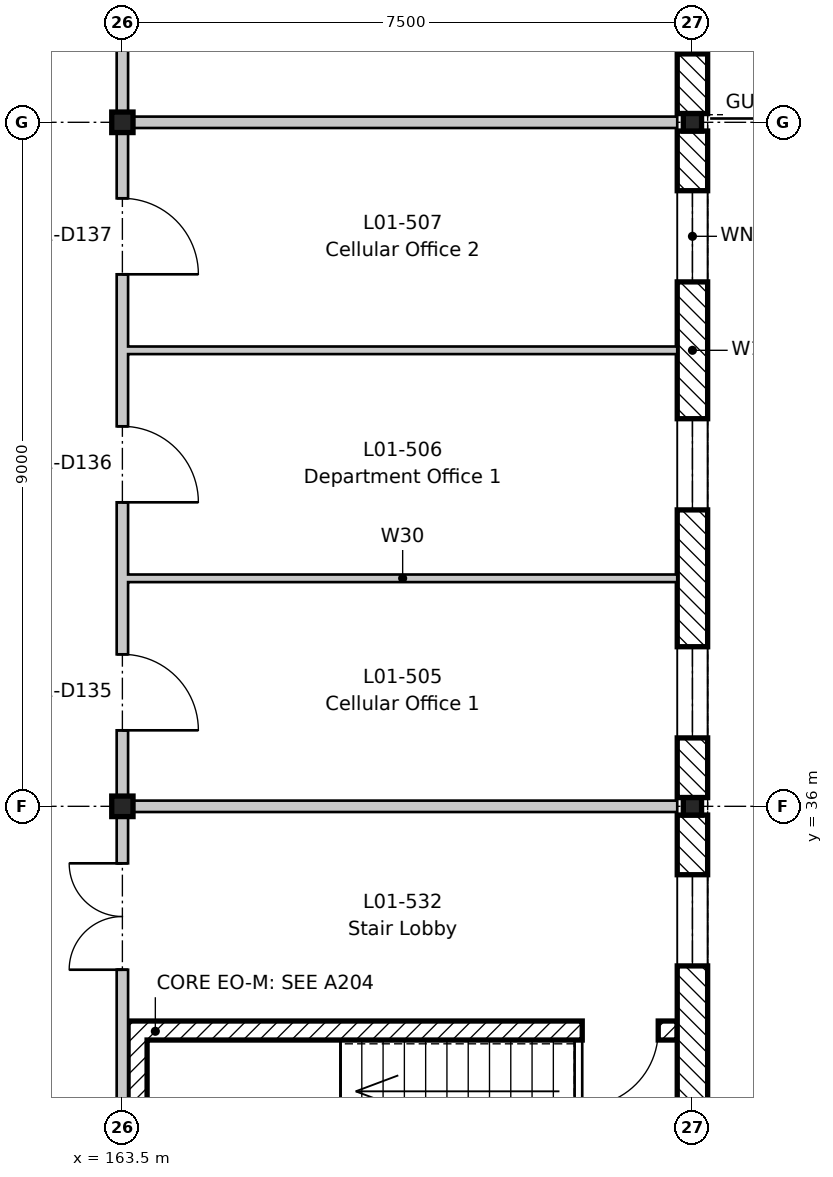
"""IFC4 building model, lengths in metres.
Left out: names, types, materials, properties, quantities, classifications, styles, units other than length and angle.
Written with IfcOpenShell. Run it as: python <this file> out.ifc"""

import sys

from ifc_helpers import new_model, si_unit, direction, frame, frame_2d, origin, origin_2d, place, context, subcontext, project, spatial, rectangle, i_section, extrude, element, fill, save


model = new_model("IFC4")
c1 = context("Model", 3, precision=1e-05, world=origin(), true_north=direction((0.0, 1.0)))
c2 = subcontext(c1, "Body", "Model", "MODEL_VIEW")
j1 = project(units=[si_unit("LENGTHUNIT", "METRE"), si_unit("PLANEANGLEUNIT", "RADIAN")], contexts=[c1])
p1 = place(None, origin())
s1 = spatial("IfcSite", under=j1, at=p1, CompositionType="ELEMENT")
p2 = place(p1, origin())
s2 = spatial("IfcBuilding", under=s1, at=p2, CompositionType="ELEMENT")
p3 = place(p2, frame((0.0, 0.0, 5.4)))
s3 = spatial("IfcBuildingStorey", under=s2, at=p3, CompositionType="ELEMENT", Elevation=5.4)
for number, where, z_axis, x_axis in (
    (1, (163.5, 36.0, -0.2), (0.0, 0.0, 1.0), (1.0, 0.0, 0.0)),
    (2, (163.5, 45.0, -0.2), (0.0, 0.0, 1.0), (1.0, 0.0, 0.0)),
):
    element("IfcColumn", number, at=place(p3, frame(where, z_axis=z_axis, x_axis=x_axis)), inside=s3, PredefinedType="COLUMN", context=c2, shape_type="SweptSolid", body=[
        extrude(i_section(OverallWidth=0.28, OverallDepth=0.27, WebThickness=0.008, FlangeThickness=0.013, FilletRadius=0.024, at=origin_2d()), origin(), (0.0, 0.0, 1.0), 4.5),
    ])
for number, where, z_axis, x_axis in (
    (3, (171.0, 36.0, -0.2), (0.0, 0.0, 1.0), (1.0, 0.0, 0.0)),
    (4, (171.0, 45.0, -0.2), (0.0, 0.0, 1.0), (1.0, 0.0, 0.0)),
):
    element("IfcColumn", number, at=place(p3, frame(where, z_axis=z_axis, x_axis=x_axis)), inside=s3, PredefinedType="COLUMN", context=c2, shape_type="SweptSolid", body=[
        extrude(i_section(OverallWidth=0.24, OverallDepth=0.23, WebThickness=0.008, FlangeThickness=0.012, FilletRadius=0.021, at=origin_2d()), origin(), (0.0, 0.0, 1.0), 4.5),
    ])
p4 = place(p3, frame((163.575, 33.05, 0.0), z_axis=(0.0, 0.0, 1.0), x_axis=(1.0, 0.0, 0.0)))
e5 = element("IfcWall", 5, at=p4, inside=s3, PredefinedType="SHEAR", context=c2, shape_type="SweptSolid", body=[
    extrude(rectangle(XDim=7.225, YDim=0.25, at=frame_2d((3.613, 0.0))), origin(), (0.0, 0.0, 1.0), 4.3),
])
p5 = place(p4, frame((5.975, 0.0, 0.0)))
e6 = element("IfcOpeningElement", 6, at=p5, cuts=e5, PredefinedType="OPENING", context=c2, shape_type="SweptSolid", body=[
    extrude(rectangle(XDim=1.0, YDim=2.1, at=frame_2d((0.5, 1.05))), frame((0.0, 0.135, 0.0), z_axis=(0.0, -1.0, 0.0), x_axis=(1.0, 0.0, 0.0)), (0.0, 0.0, 1.0), 0.27),
])
p6 = place(p3, frame((163.7, 30.075, 0.0), z_axis=(0.0, 0.0, 1.0), x_axis=(0.0, 1.0, 0.0)))
e7 = element("IfcWall", 7, at=p6, inside=s3, PredefinedType="SHEAR", context=c2, shape_type="SweptSolid", body=[
    extrude(rectangle(XDim=2.85, YDim=0.25, at=frame_2d((1.425, 0.0))), origin(), (0.0, 0.0, 1.0), 4.3),
])
p7 = place(p3, frame((171.0, 35.885, 0.0), z_axis=(0.0, 0.0, 1.0), x_axis=(0.0, -1.0, 0.0)))
e8 = element("IfcWall", 8, at=p7, inside=s3, PredefinedType="STANDARD", context=c2, shape_type="SweptSolid", body=[
    extrude(rectangle(XDim=8.77, YDim=0.4, at=frame_2d((4.385, 0.0))), origin(), (0.0, 0.0, 1.0), 3.9),
])
p8 = place(p7, frame((3.785, 0.0, 0.9)))
e9 = element("IfcOpeningElement", 9, at=p8, cuts=e8, PredefinedType="OPENING", context=c2, shape_type="SweptSolid", body=[
    extrude(rectangle(XDim=1.2, YDim=2.7, at=frame_2d((0.6, 1.35))), frame((0.0, 0.21, 0.0), z_axis=(0.0, -1.0, 0.0), x_axis=(1.0, 0.0, 0.0)), (0.0, 0.0, 1.0), 0.42),
])
p9 = place(p7, frame((0.785, 0.0, 0.9)))
e10 = element("IfcOpeningElement", 10, at=p9, cuts=e8, PredefinedType="OPENING", context=c2, shape_type="SweptSolid", body=[
    extrude(rectangle(XDim=1.2, YDim=2.4, at=frame_2d((0.6, 1.2))), frame((0.0, 0.21, 0.0), z_axis=(0.0, -1.0, 0.0), x_axis=(1.0, 0.0, 0.0)), (0.0, 0.0, 1.0), 0.42),
])
p10 = place(p3, frame((171.0, 44.885, 0.0), z_axis=(0.0, 0.0, 1.0), x_axis=(0.0, -1.0, 0.0)))
e11 = element("IfcWall", 11, at=p10, inside=s3, PredefinedType="STANDARD", context=c2, shape_type="SweptSolid", body=[
    extrude(rectangle(XDim=8.77, YDim=0.4, at=frame_2d((4.385, 0.0))), origin(), (0.0, 0.0, 1.0), 3.9),
])
p11 = place(p10, frame((6.785, 0.0, 0.9)))
e12 = element("IfcOpeningElement", 12, at=p11, cuts=e11, PredefinedType="OPENING", context=c2, shape_type="SweptSolid", body=[
    extrude(rectangle(XDim=1.2, YDim=2.4, at=frame_2d((0.6, 1.2))), frame((0.0, 0.21, 0.0), z_axis=(0.0, -1.0, 0.0), x_axis=(1.0, 0.0, 0.0)), (0.0, 0.0, 1.0), 0.42),
])
p12 = place(p10, frame((3.785, 0.0, 0.9)))
e13 = element("IfcOpeningElement", 13, at=p12, cuts=e11, PredefinedType="OPENING", context=c2, shape_type="SweptSolid", body=[
    extrude(rectangle(XDim=1.2, YDim=2.4, at=frame_2d((0.6, 1.2))), frame((0.0, 0.21, 0.0), z_axis=(0.0, -1.0, 0.0), x_axis=(1.0, 0.0, 0.0)), (0.0, 0.0, 1.0), 0.42),
])
p13 = place(p10, frame((0.785, 0.0, 0.9)))
e14 = element("IfcOpeningElement", 14, at=p13, cuts=e11, PredefinedType="OPENING", context=c2, shape_type="SweptSolid", body=[
    extrude(rectangle(XDim=1.2, YDim=2.4, at=frame_2d((0.6, 1.2))), frame((0.0, 0.21, 0.0), z_axis=(0.0, -1.0, 0.0), x_axis=(1.0, 0.0, 0.0)), (0.0, 0.0, 1.0), 0.42),
])
p14 = place(p3, frame((171.0, 53.885, 0.0), z_axis=(0.0, 0.0, 1.0), x_axis=(0.0, -1.0, 0.0)))
e15 = element("IfcWall", 15, at=p14, inside=s3, PredefinedType="STANDARD", context=c2, shape_type="SweptSolid", body=[
    extrude(rectangle(XDim=8.77, YDim=0.4, at=frame_2d((4.385, 0.0))), origin(), (0.0, 0.0, 1.0), 3.9),
])
p15 = place(p14, frame((6.785, 0.0, 0.9)))
e16 = element("IfcOpeningElement", 16, at=p15, cuts=e15, PredefinedType="OPENING", context=c2, shape_type="SweptSolid", body=[
    extrude(rectangle(XDim=1.2, YDim=2.4, at=frame_2d((0.6, 1.2))), frame((0.0, 0.21, 0.0), z_axis=(0.0, -1.0, 0.0), x_axis=(1.0, 0.0, 0.0)), (0.0, 0.0, 1.0), 0.42),
])
p16 = place(p14, frame((3.785, 0.0, 0.9)))
e17 = element("IfcOpeningElement", 17, at=p16, cuts=e15, PredefinedType="OPENING", context=c2, shape_type="SweptSolid", body=[
    extrude(rectangle(XDim=1.2, YDim=2.4, at=frame_2d((0.6, 1.2))), frame((0.0, 0.21, 0.0), z_axis=(0.0, -1.0, 0.0), x_axis=(1.0, 0.0, 0.0)), (0.0, 0.0, 1.0), 0.42),
])
p17 = place(p3, frame((163.575, 36.0, 0.0), z_axis=(0.0, 0.0, 1.0), x_axis=(1.0, 0.0, 0.0)))
e18 = element("IfcWall", 18, at=p17, inside=s3, PredefinedType="PARTITIONING", context=c2, shape_type="SweptSolid", body=[
    extrude(rectangle(XDim=7.225, YDim=0.15, at=frame_2d((3.613, 0.0))), origin(), (0.0, 0.0, 1.0), 3.95),
])
for number, where, z_axis, x_axis in (
    (19, (163.575, 39.0, 0.0), (0.0, 0.0, 1.0), (1.0, 0.0, 0.0)),
    (20, (163.575, 42.0, 0.0), (0.0, 0.0, 1.0), (1.0, 0.0, 0.0)),
):
    element("IfcWall", number, at=place(p3, frame(where, z_axis=z_axis, x_axis=x_axis)), inside=s3, PredefinedType="PARTITIONING", context=c2, shape_type="SweptSolid", body=[
        extrude(rectangle(XDim=7.225, YDim=0.1, at=frame_2d((3.613, 0.0))), origin(), (0.0, 0.0, 1.0), 4.3),
    ])
p18 = place(p3, frame((163.575, 45.0, 0.0), z_axis=(0.0, 0.0, 1.0), x_axis=(1.0, 0.0, 0.0)))
e21 = element("IfcWall", 21, at=p18, inside=s3, PredefinedType="PARTITIONING", context=c2, shape_type="SweptSolid", body=[
    extrude(rectangle(XDim=7.225, YDim=0.15, at=frame_2d((3.613, 0.0))), origin(), (0.0, 0.0, 1.0), 3.95),
])
p19 = place(p3, frame((163.5, -8.8, 0.0), z_axis=(0.0, 0.0, 1.0), x_axis=(0.0, 1.0, 0.0)))
e22 = element("IfcWall", 22, at=p19, inside=s3, PredefinedType="PARTITIONING", context=c2, shape_type="SweptSolid", body=[
    extrude(rectangle(XDim=62.6, YDim=0.15, at=frame_2d((31.3, 0.0))), origin(), (0.0, 0.0, 1.0), 3.78),
])
p20 = place(p19, frame((18.8, 0.0, 0.0)))
e23 = element("IfcOpeningElement", 23, at=p20, cuts=e22, PredefinedType="OPENING", context=c2, shape_type="SweptSolid", body=[
    extrude(rectangle(XDim=1.0, YDim=2.1, at=frame_2d((0.5, 1.05))), frame((0.0, 0.085, 0.0), z_axis=(0.0, -1.0, 0.0), x_axis=(1.0, 0.0, 0.0)), (0.0, 0.0, 1.0), 0.17),
])
p21 = place(p19, frame((23.3, 0.0, 0.0)))
e24 = element("IfcOpeningElement", 24, at=p21, cuts=e22, PredefinedType="OPENING", context=c2, shape_type="SweptSolid", body=[
    extrude(rectangle(XDim=1.0, YDim=2.1, at=frame_2d((0.5, 1.05))), frame((0.0, 0.085, 0.0), z_axis=(0.0, -1.0, 0.0), x_axis=(1.0, 0.0, 0.0)), (0.0, 0.0, 1.0), 0.17),
])
p22 = place(p19, frame((29.3, 0.0, 0.0)))
e25 = element("IfcOpeningElement", 25, at=p22, cuts=e22, PredefinedType="OPENING", context=c2, shape_type="SweptSolid", body=[
    extrude(rectangle(XDim=1.0, YDim=2.1, at=frame_2d((0.5, 1.05))), frame((0.0, 0.085, 0.0), z_axis=(0.0, -1.0, 0.0), x_axis=(1.0, 0.0, 0.0)), (0.0, 0.0, 1.0), 0.17),
])
p23 = place(p19, frame((33.8, 0.0, 0.0)))
e26 = element("IfcOpeningElement", 26, at=p23, cuts=e22, PredefinedType="OPENING", context=c2, shape_type="SweptSolid", body=[
    extrude(rectangle(XDim=1.0, YDim=2.1, at=frame_2d((0.5, 1.05))), frame((0.0, 0.085, 0.0), z_axis=(0.0, -1.0, 0.0), x_axis=(1.0, 0.0, 0.0)), (0.0, 0.0, 1.0), 0.17),
])
p24 = place(p19, frame((45.8, 0.0, 0.0)))
e27 = element("IfcOpeningElement", 27, at=p24, cuts=e22, PredefinedType="OPENING", context=c2, shape_type="SweptSolid", body=[
    extrude(rectangle(XDim=1.0, YDim=2.1, at=frame_2d((0.5, 1.05))), frame((0.0, 0.085, 0.0), z_axis=(0.0, -1.0, 0.0), x_axis=(1.0, 0.0, 0.0)), (0.0, 0.0, 1.0), 0.17),
])
p25 = place(p19, frame((48.8, 0.0, 0.0)))
e28 = element("IfcOpeningElement", 28, at=p25, cuts=e22, PredefinedType="OPENING", context=c2, shape_type="SweptSolid", body=[
    extrude(rectangle(XDim=1.0, YDim=2.1, at=frame_2d((0.5, 1.05))), frame((0.0, 0.085, 0.0), z_axis=(0.0, -1.0, 0.0), x_axis=(1.0, 0.0, 0.0)), (0.0, 0.0, 1.0), 0.17),
])
p26 = place(p19, frame((51.8, 0.0, 0.0)))
e29 = element("IfcOpeningElement", 29, at=p26, cuts=e22, PredefinedType="OPENING", context=c2, shape_type="SweptSolid", body=[
    extrude(rectangle(XDim=1.0, YDim=2.1, at=frame_2d((0.5, 1.05))), frame((0.0, 0.085, 0.0), z_axis=(0.0, -1.0, 0.0), x_axis=(1.0, 0.0, 0.0)), (0.0, 0.0, 1.0), 0.17),
])
p27 = place(p19, frame((12.6, 0.0, 0.0)))
e30 = element("IfcOpeningElement", 30, at=p27, cuts=e22, PredefinedType="OPENING", context=c2, shape_type="SweptSolid", body=[
    extrude(rectangle(XDim=1.4, YDim=2.1, at=frame_2d((0.7, 1.05))), frame((0.0, 0.085, 0.0), z_axis=(0.0, -1.0, 0.0), x_axis=(1.0, 0.0, 0.0)), (0.0, 0.0, 1.0), 0.17),
])
p28 = place(p19, frame((3.6, 0.0, 0.0)))
e31 = element("IfcOpeningElement", 31, at=p28, cuts=e22, PredefinedType="OPENING", context=c2, shape_type="SweptSolid", body=[
    extrude(rectangle(XDim=1.4, YDim=2.1, at=frame_2d((0.7, 1.05))), frame((0.0, 0.085, 0.0), z_axis=(0.0, -1.0, 0.0), x_axis=(1.0, 0.0, 0.0)), (0.0, 0.0, 1.0), 0.17),
])
p29 = place(p19, frame((57.6, 0.0, 0.0)))
e32 = element("IfcOpeningElement", 32, at=p29, cuts=e22, PredefinedType="OPENING", context=c2, shape_type="SweptSolid", body=[
    extrude(rectangle(XDim=1.4, YDim=2.1, at=frame_2d((0.7, 1.05))), frame((0.0, 0.085, 0.0), z_axis=(0.0, -1.0, 0.0), x_axis=(1.0, 0.0, 0.0)), (0.0, 0.0, 1.0), 0.17),
])
p30 = place(p19, frame((36.75, 0.0, 0.0)))
e33 = element("IfcOpeningElement", 33, at=p30, cuts=e22, PredefinedType="OPENING", context=c2, shape_type="SweptSolid", body=[
    extrude(rectangle(XDim=1.0, YDim=2.1, at=frame_2d((0.5, 1.05))), frame((0.0, 0.085, 0.0), z_axis=(0.0, -1.0, 0.0), x_axis=(1.0, 0.0, 0.0)), (0.0, 0.0, 1.0), 0.17),
])
p31 = place(p19, frame((42.65, 0.0, 0.0)))
e34 = element("IfcOpeningElement", 34, at=p31, cuts=e22, PredefinedType="OPENING", context=c2, shape_type="SweptSolid", body=[
    extrude(rectangle(XDim=1.4, YDim=2.1, at=frame_2d((0.7, 1.05))), frame((0.0, 0.085, 0.0), z_axis=(0.0, -1.0, 0.0), x_axis=(1.0, 0.0, 0.0)), (0.0, 0.0, 1.0), 0.17),
])
p32 = place(p9, origin())
e35 = element("IfcWindow", 35, at=p32, inside=s3, PartitioningType="SINGLE_PANEL", PredefinedType="WINDOW", context=c2, shape_type="SweptSolid", body=[
    extrude(rectangle(XDim=1.2, YDim=2.4, at=frame_2d((0.6, 1.2))), frame((0.0, -0.12, 0.0), z_axis=(0.0, -1.0, 0.0), x_axis=(1.0, 0.0, 0.0)), (0.0, 0.0, 1.0), 0.06),
])
fill(e10, e35)
p33 = place(p11, origin())
e36 = element("IfcWindow", 36, at=p33, inside=s3, PartitioningType="SINGLE_PANEL", PredefinedType="WINDOW", context=c2, shape_type="SweptSolid", body=[
    extrude(rectangle(XDim=1.2, YDim=2.4, at=frame_2d((0.6, 1.2))), frame((0.0, -0.12, 0.0), z_axis=(0.0, -1.0, 0.0), x_axis=(1.0, 0.0, 0.0)), (0.0, 0.0, 1.0), 0.06),
])
fill(e12, e36)
p34 = place(p12, origin())
e37 = element("IfcWindow", 37, at=p34, inside=s3, PartitioningType="SINGLE_PANEL", PredefinedType="WINDOW", context=c2, shape_type="SweptSolid", body=[
    extrude(rectangle(XDim=1.2, YDim=2.4, at=frame_2d((0.6, 1.2))), frame((0.0, -0.12, 0.0), z_axis=(0.0, -1.0, 0.0), x_axis=(1.0, 0.0, 0.0)), (0.0, 0.0, 1.0), 0.06),
])
fill(e13, e37)
p35 = place(p13, origin())
e38 = element("IfcWindow", 38, at=p35, inside=s3, PartitioningType="SINGLE_PANEL", PredefinedType="WINDOW", context=c2, shape_type="SweptSolid", body=[
    extrude(rectangle(XDim=1.2, YDim=2.4, at=frame_2d((0.6, 1.2))), frame((0.0, -0.12, 0.0), z_axis=(0.0, -1.0, 0.0), x_axis=(1.0, 0.0, 0.0)), (0.0, 0.0, 1.0), 0.06),
])
fill(e14, e38)
p36 = place(p15, origin())
e39 = element("IfcWindow", 39, at=p36, inside=s3, PartitioningType="SINGLE_PANEL", PredefinedType="WINDOW", context=c2, shape_type="SweptSolid", body=[
    extrude(rectangle(XDim=1.2, YDim=2.4, at=frame_2d((0.6, 1.2))), frame((0.0, -0.12, 0.0), z_axis=(0.0, -1.0, 0.0), x_axis=(1.0, 0.0, 0.0)), (0.0, 0.0, 1.0), 0.06),
])
fill(e16, e39)
p37 = place(p24, frame((1.0, 0.0, 0.0), z_axis=(0.0, 0.0, 1.0), x_axis=(-1.0, 0.0, 0.0)))
e40 = element("IfcDoor", 40, at=p37, inside=s3, OperationType="SINGLE_SWING_RIGHT", PredefinedType="DOOR", context=c2, shape_type="SweptSolid", body=[
    extrude(rectangle(XDim=1.0, YDim=2.1, at=frame_2d((0.5, 1.05))), frame((0.0, 0.025, 0.0), z_axis=(0.0, -1.0, 0.0), x_axis=(1.0, 0.0, 0.0)), (0.0, 0.0, 1.0), 0.05),
])
fill(e27, e40)
p38 = place(p25, frame((1.0, 0.0, 0.0), z_axis=(0.0, 0.0, 1.0), x_axis=(-1.0, 0.0, 0.0)))
e41 = element("IfcDoor", 41, at=p38, inside=s3, OperationType="SINGLE_SWING_RIGHT", PredefinedType="DOOR", context=c2, shape_type="SweptSolid", body=[
    extrude(rectangle(XDim=1.0, YDim=2.1, at=frame_2d((0.5, 1.05))), frame((0.0, 0.025, 0.0), z_axis=(0.0, -1.0, 0.0), x_axis=(1.0, 0.0, 0.0)), (0.0, 0.0, 1.0), 0.05),
])
fill(e28, e41)
p39 = place(p26, frame((1.0, 0.0, 0.0), z_axis=(0.0, 0.0, 1.0), x_axis=(-1.0, 0.0, 0.0)))
e42 = element("IfcDoor", 42, at=p39, inside=s3, OperationType="SINGLE_SWING_RIGHT", PredefinedType="DOOR", context=c2, shape_type="SweptSolid", body=[
    extrude(rectangle(XDim=1.0, YDim=2.1, at=frame_2d((0.5, 1.05))), frame((0.0, 0.025, 0.0), z_axis=(0.0, -1.0, 0.0), x_axis=(1.0, 0.0, 0.0)), (0.0, 0.0, 1.0), 0.05),
])
fill(e29, e42)
p40 = place(p5, frame((1.0, 0.0, 0.0), z_axis=(0.0, 0.0, 1.0), x_axis=(-1.0, 0.0, 0.0)))
e43 = element("IfcDoor", 43, at=p40, inside=s3, OperationType="SINGLE_SWING_RIGHT", PredefinedType="DOOR", context=c2, shape_type="SweptSolid", body=[
    extrude(rectangle(XDim=1.0, YDim=2.1, at=frame_2d((0.5, 1.05))), frame((0.0, 0.025, 0.0), z_axis=(0.0, -1.0, 0.0), x_axis=(1.0, 0.0, 0.0)), (0.0, 0.0, 1.0), 0.05),
])
fill(e6, e43)
p41 = place(p31, origin())
e44 = element("IfcDoor", 44, at=p41, inside=s3, OperationType="DOUBLE_DOOR_SINGLE_SWING", PredefinedType="DOOR", context=c2, shape_type="SweptSolid", body=[
    extrude(rectangle(XDim=1.4, YDim=2.1, at=frame_2d((0.7, 1.05))), frame((0.0, 0.025, 0.0), z_axis=(0.0, -1.0, 0.0), x_axis=(1.0, 0.0, 0.0)), (0.0, 0.0, 1.0), 0.05),
])
fill(e34, e44)
save(model, sys.argv[1])
